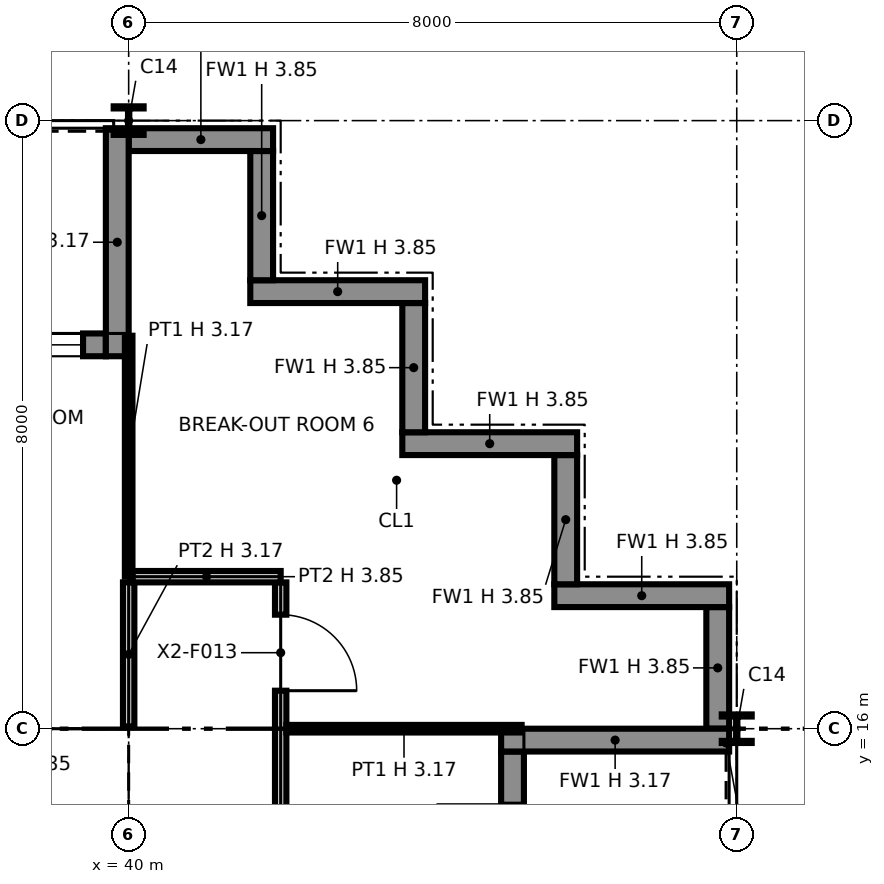
"""IFC4 building model, lengths in metres.
Left out: names, types, materials, properties, quantities, classifications, styles, units other than length and angle.
Written with IfcOpenShell. Run it as: python <this file> out.ifc"""

import sys

from ifc_helpers import new_model, si_unit, direction, frame, frame_2d, origin, origin_2d, place, context, subcontext, project, spatial, polyline, rectangle, i_section, outline, extrude, element, fill, save


model = new_model("IFC4")
c1 = context("Model", 3, precision=1e-05, world=origin(), true_north=direction((0.0, 1.0)))
c2 = subcontext(c1, "Body", "Model", "MODEL_VIEW")
j1 = project(units=[si_unit("LENGTHUNIT", "METRE"), si_unit("PLANEANGLEUNIT", "RADIAN")], contexts=[c1])
p1 = place(None, origin())
s1 = spatial("IfcSite", under=j1, at=p1, CompositionType="ELEMENT")
p2 = place(p1, origin())
s2 = spatial("IfcBuilding", under=s1, at=p2, CompositionType="ELEMENT")
p3 = place(p2, frame((0.0, 0.0, 263.0)))
s3 = spatial("IfcBuildingStorey", under=s2, at=p3, CompositionType="ELEMENT", Elevation=263.0)
p4 = place(p3, frame((40.0, 16.0, 0.0), z_axis=(0.0, 0.0, 1.0), x_axis=(1.0, 0.0, 0.0)))
e1 = element("IfcColumn", 1, at=p4, inside=s3, PredefinedType="COLUMN", context=c2, shape_type="SweptSolid", body=[
    extrude(i_section(OverallWidth=0.371, OverallDepth=0.361, WebThickness=0.012, FlangeThickness=0.02, at=origin_2d()), origin(), (0.0, 0.0, 1.0), 3.85),
])
for number, where, z_axis, x_axis in (
    (2, (40.0, 24.0, 0.0), (0.0, 0.0, 1.0), (1.0, 0.0, 0.0)),
    (3, (48.0, 16.0, 0.0), (0.0, 0.0, 1.0), (1.0, 0.0, 0.0)),
):
    element("IfcColumn", number, at=place(p3, frame(where, z_axis=z_axis, x_axis=x_axis)), inside=s3, PredefinedType="COLUMN", context=c2, shape_type="SweptSolid", body=[
        extrude(i_section(OverallWidth=0.394, OverallDepth=0.376, WebThickness=0.017, FlangeThickness=0.028, at=origin_2d()), origin(), (0.0, 0.0, 1.0), 3.85),
    ])
p5 = place(p3, frame((45.05, 8.3, 0.0), z_axis=(0.0, 0.0, 1.0), x_axis=(0.0, 1.0, 0.0)))
e4 = element("IfcWall", 4, at=p5, inside=s3, PredefinedType="SOLIDWALL", context=c2, shape_type="SweptSolid", body=[
    extrude(rectangle(XDim=7.4, YDim=0.3, at=frame_2d((3.7, 0.0))), origin(), (0.0, 0.0, 1.0), 3.85),
])
p6 = place(p5, frame((0.3, 0.0, 0.9)))
e5 = element("IfcOpeningElement", 5, at=p6, cuts=e4, PredefinedType="OPENING", context=c2, shape_type="SweptSolid", body=[
    extrude(rectangle(XDim=2.8, YDim=2.2, at=frame_2d((1.4, 1.1))), frame((0.0, 0.16, 0.0), z_axis=(0.0, -1.0, 0.0), x_axis=(1.0, 0.0, 0.0)), (0.0, 0.0, 1.0), 0.32),
])
p7 = place(p5, frame((4.7, 0.0, 0.0)))
e6 = element("IfcOpeningElement", 6, at=p7, cuts=e4, PredefinedType="OPENING", context=c2, shape_type="SweptSolid", body=[
    extrude(rectangle(XDim=2.0, YDim=2.4, at=frame_2d((1.0, 1.2))), frame((0.0, 0.16, 0.0), z_axis=(0.0, -1.0, 0.0), x_axis=(1.0, 0.0, 0.0)), (0.0, 0.0, 1.0), 0.32),
])
p8 = place(p3, frame((47.9, 15.85, 0.0), z_axis=(0.0, 0.0, 1.0), x_axis=(-1.0, 0.0, 0.0)))
e7 = element("IfcWall", 7, at=p8, inside=s3, PredefinedType="SOLIDWALL", context=c2, shape_type="SweptSolid", body=[
    extrude(rectangle(XDim=3.0, YDim=0.3, at=frame_2d((1.5, 0.0))), origin(), (0.0, 0.0, 1.0), 3.171),
])
p9 = place(p3, frame((47.75, 16.0, 0.0), z_axis=(0.0, 0.0, 1.0), x_axis=(0.0, 1.0, 0.0)))
e8 = element("IfcWall", 8, at=p9, inside=s3, PredefinedType="SOLIDWALL", context=c2, shape_type="SweptSolid", body=[
    extrude(rectangle(XDim=1.6, YDim=0.3, at=frame_2d((0.8, 0.0))), origin(), (0.0, 0.0, 1.0), 3.85),
])
p10 = place(p3, frame((47.9, 17.75, 0.0), z_axis=(0.0, 0.0, 1.0), x_axis=(-1.0, 0.0, 0.0)))
e9 = element("IfcWall", 9, at=p10, inside=s3, PredefinedType="SOLIDWALL", context=c2, shape_type="SweptSolid", body=[
    extrude(rectangle(XDim=2.3, YDim=0.3, at=frame_2d((1.15, 0.0))), origin(), (0.0, 0.0, 1.0), 3.85),
])
p11 = place(p3, frame((45.75, 17.9, 0.0), z_axis=(0.0, 0.0, 1.0), x_axis=(0.0, 1.0, 0.0)))
e10 = element("IfcWall", 10, at=p11, inside=s3, PredefinedType="SOLIDWALL", context=c2, shape_type="SweptSolid", body=[
    extrude(rectangle(XDim=1.7, YDim=0.3, at=frame_2d((0.85, 0.0))), origin(), (0.0, 0.0, 1.0), 3.85),
])
p12 = place(p3, frame((45.9, 19.75, 0.0), z_axis=(0.0, 0.0, 1.0), x_axis=(-1.0, 0.0, 0.0)))
e11 = element("IfcWall", 11, at=p12, inside=s3, PredefinedType="SOLIDWALL", context=c2, shape_type="SweptSolid", body=[
    extrude(rectangle(XDim=2.3, YDim=0.3, at=frame_2d((1.15, 0.0))), origin(), (0.0, 0.0, 1.0), 3.85),
])
p13 = place(p3, frame((43.75, 19.9, 0.0), z_axis=(0.0, 0.0, 1.0), x_axis=(0.0, 1.0, 0.0)))
e12 = element("IfcWall", 12, at=p13, inside=s3, PredefinedType="SOLIDWALL", context=c2, shape_type="SweptSolid", body=[
    extrude(rectangle(XDim=1.7, YDim=0.3, at=frame_2d((0.85, 0.0))), origin(), (0.0, 0.0, 1.0), 3.85),
])
p14 = place(p3, frame((43.9, 21.75, 0.0), z_axis=(0.0, 0.0, 1.0), x_axis=(-1.0, 0.0, 0.0)))
e13 = element("IfcWall", 13, at=p14, inside=s3, PredefinedType="SOLIDWALL", context=c2, shape_type="SweptSolid", body=[
    extrude(rectangle(XDim=2.3, YDim=0.3, at=frame_2d((1.15, 0.0))), origin(), (0.0, 0.0, 1.0), 3.85),
])
p15 = place(p3, frame((41.75, 21.9, 0.0), z_axis=(0.0, 0.0, 1.0), x_axis=(0.0, 1.0, 0.0)))
e14 = element("IfcWall", 14, at=p15, inside=s3, PredefinedType="SOLIDWALL", context=c2, shape_type="SweptSolid", body=[
    extrude(rectangle(XDim=1.7, YDim=0.3, at=frame_2d((0.85, 0.0))), origin(), (0.0, 0.0, 1.0), 3.85),
])
p16 = place(p3, frame((41.9, 23.75, 0.0), z_axis=(0.0, 0.0, 1.0), x_axis=(-1.0, 0.0, 0.0)))
e15 = element("IfcWall", 15, at=p16, inside=s3, PredefinedType="SOLIDWALL", context=c2, shape_type="SweptSolid", body=[
    extrude(rectangle(XDim=1.9, YDim=0.3, at=frame_2d((0.95, 0.0))), origin(), (0.0, 0.0, 1.0), 3.85),
])
p17 = place(p3, frame((39.7, 21.05, 0.0), z_axis=(0.0, 0.0, 1.0), x_axis=(-1.0, 0.0, 0.0)))
e16 = element("IfcWall", 16, at=p17, inside=s3, PredefinedType="SOLIDWALL", context=c2, shape_type="SweptSolid", body=[
    extrude(rectangle(XDim=7.4, YDim=0.3, at=frame_2d((3.7, 0.0))), origin(), (0.0, 0.0, 1.0), 3.85),
])
p18 = place(p17, frame((0.3, 0.0, 0.9)))
e17 = element("IfcOpeningElement", 17, at=p18, cuts=e16, PredefinedType="OPENING", context=c2, shape_type="SweptSolid", body=[
    extrude(rectangle(XDim=2.8, YDim=2.2, at=frame_2d((1.4, 1.1))), frame((0.0, 0.16, 0.0), z_axis=(0.0, -1.0, 0.0), x_axis=(1.0, 0.0, 0.0)), (0.0, 0.0, 1.0), 0.32),
])
p19 = place(p17, frame((4.7, 0.0, 0.0)))
e18 = element("IfcOpeningElement", 18, at=p19, cuts=e16, PredefinedType="OPENING", context=c2, shape_type="SweptSolid", body=[
    extrude(rectangle(XDim=2.0, YDim=2.4, at=frame_2d((1.0, 1.2))), frame((0.0, 0.16, 0.0), z_axis=(0.0, -1.0, 0.0), x_axis=(1.0, 0.0, 0.0)), (0.0, 0.0, 1.0), 0.32),
])
p20 = place(p3, frame((39.85, 23.9, 0.0), z_axis=(0.0, 0.0, 1.0), x_axis=(0.0, -1.0, 0.0)))
e19 = element("IfcWall", 19, at=p20, inside=s3, PredefinedType="SOLIDWALL", context=c2, shape_type="SweptSolid", body=[
    extrude(rectangle(XDim=3.0, YDim=0.3, at=frame_2d((1.5, 0.0))), origin(), (0.0, 0.0, 1.0), 3.171),
])
p21 = place(p3, frame((24.65, 15.25, 0.0), z_axis=(0.0, 0.0, 1.0), x_axis=(1.0, 0.0, 0.0)))
e20 = element("IfcWall", 20, at=p21, inside=s3, PredefinedType="PARTITIONING", context=c2, shape_type="SweptSolid", body=[
    extrude(outline(polyline([(0.0, 0.0), (14.7, 0.0), (14.7, 3.85), (7.438, 3.85), (7.438, 3.308), (7.262, 3.308), (7.261, 3.85), (0.0, 3.85), (0.0, 0.0)])), frame((0.0, 0.1, 0.0), z_axis=(0.0, -1.0, 0.0), x_axis=(1.0, 0.0, 0.0)), (0.0, 0.0, 1.0), 0.2),
])
p22 = place(p21, frame((2.85, 0.0, 0.0)))
e21 = element("IfcOpeningElement", 21, at=p22, cuts=e20, PredefinedType="OPENING", context=c2, shape_type="SweptSolid", body=[
    extrude(rectangle(XDim=1.8, YDim=2.1, at=frame_2d((0.9, 1.05))), frame((0.0, 0.11, 0.0), z_axis=(0.0, -1.0, 0.0), x_axis=(1.0, 0.0, 0.0)), (0.0, 0.0, 1.0), 0.22),
])
p23 = place(p21, frame((9.95, 0.0, 0.0), z_axis=(0.0, 0.0, 1.0), x_axis=(-1.0, 0.0, 0.0)))
e22 = element("IfcOpeningElement", 22, at=p23, cuts=e20, PredefinedType="OPENING", context=c2, shape_type="SweptSolid", body=[
    extrude(rectangle(XDim=1.4, YDim=2.1, at=frame_2d((0.7, 1.05))), frame((0.0, 0.11, 0.0), z_axis=(0.0, -1.0, 0.0), x_axis=(1.0, 0.0, 0.0)), (0.0, 0.0, 1.0), 0.22),
])
p24 = place(p21, frame((13.4, 0.0, 0.0), z_axis=(0.0, 0.0, 1.0), x_axis=(-1.0, 0.0, 0.0)))
e23 = element("IfcOpeningElement", 23, at=p24, cuts=e20, PredefinedType="OPENING", context=c2, shape_type="SweptSolid", body=[
    extrude(rectangle(XDim=1.4, YDim=2.1, at=frame_2d((0.7, 1.05))), frame((0.0, 0.11, 0.0), z_axis=(0.0, -1.0, 0.0), x_axis=(1.0, 0.0, 0.0)), (0.0, 0.0, 1.0), 0.22),
])
p25 = place(p3, frame((39.25, 8.85, 0.0), z_axis=(0.0, 0.0, 1.0), x_axis=(0.0, 1.0, 0.0)))
e24 = element("IfcWall", 24, at=p25, inside=s3, PredefinedType="PARTITIONING", context=c2, shape_type="SweptSolid", body=[
    extrude(rectangle(XDim=6.3, YDim=0.2, at=frame_2d((3.15, 0.0))), origin(), (0.0, 0.0, 1.0), 3.85),
])
p26 = place(p3, frame((42.0, 6.0, 0.0), z_axis=(0.0, 0.0, 1.0), x_axis=(0.0, 1.0, 0.0)))
e25 = element("IfcWall", 25, at=p26, inside=s3, PredefinedType="PARTITIONING", context=c2, shape_type="SweptSolid", body=[
    extrude(outline(polyline([(0.0, 0.0), (11.925, 0.0), (11.925, 3.85), (10.3, 3.85), (10.298, 3.172), (9.702, 3.172), (9.7, 3.85), (6.3, 3.85), (6.298, 3.172), (5.702, 3.172), (5.7, 3.85), (2.3, 3.85), (2.298, 3.172), (1.702, 3.172), (1.7, 3.85), (0.0, 3.85), (0.0, 0.0)])), frame((0.0, 0.075, 0.0), z_axis=(0.0, -1.0, 0.0), x_axis=(1.0, 0.0, 0.0)), (0.0, 0.0, 1.0), 0.15),
])
p27 = place(p26, frame((6.5, 0.0, 0.0), z_axis=(0.0, 0.0, 1.0), x_axis=(-1.0, 0.0, 0.0)))
e26 = element("IfcOpeningElement", 26, at=p27, cuts=e25, PredefinedType="OPENING", context=c2, shape_type="SweptSolid", body=[
    extrude(rectangle(XDim=1.0, YDim=2.1, at=frame_2d((0.5, 1.05))), frame((0.0, 0.085, 0.0), z_axis=(0.0, -1.0, 0.0), x_axis=(1.0, 0.0, 0.0)), (0.0, 0.0, 1.0), 0.17),
])
p28 = place(p26, frame((11.5, 0.0, 0.0), z_axis=(0.0, 0.0, 1.0), x_axis=(-1.0, 0.0, 0.0)))
e27 = element("IfcOpeningElement", 27, at=p28, cuts=e25, PredefinedType="OPENING", context=c2, shape_type="SweptSolid", body=[
    extrude(rectangle(XDim=1.0, YDim=2.1, at=frame_2d((0.5, 1.05))), frame((0.0, 0.085, 0.0), z_axis=(0.0, -1.0, 0.0), x_axis=(1.0, 0.0, 0.0)), (0.0, 0.0, 1.0), 0.17),
])
p29 = place(p3, frame((42.075, 16.0, 0.0), z_axis=(0.0, 0.0, 1.0), x_axis=(1.0, 0.0, 0.0)))
e28 = element("IfcWall", 28, at=p29, inside=s3, PredefinedType="PARTITIONING", context=c2, shape_type="SweptSolid", body=[
    extrude(rectangle(XDim=3.095, YDim=0.1, at=frame_2d((1.547, 0.0))), origin(), (0.0, 0.0, 1.0), 3.172),
])
p30 = place(p3, frame((40.0, 16.03, 0.0), z_axis=(0.0, 0.0, 1.0), x_axis=(0.0, 1.0, 0.0)))
e29 = element("IfcWall", 29, at=p30, inside=s3, PredefinedType="PARTITIONING", context=c2, shape_type="SweptSolid", body=[
    extrude(rectangle(XDim=1.895, YDim=0.15, at=frame_2d((0.948, 0.0))), origin(), (0.0, 0.0, 1.0), 3.172),
])
p31 = place(p3, frame((40.05, 18.0, 0.0), z_axis=(0.0, 0.0, 1.0), x_axis=(1.0, 0.0, 0.0)))
e30 = element("IfcWall", 30, at=p31, inside=s3, PredefinedType="PARTITIONING", context=c2, shape_type="SweptSolid", body=[
    extrude(rectangle(XDim=1.95, YDim=0.15, at=frame_2d((0.975, 0.0))), origin(), (0.0, 0.0, 1.0), 3.85),
])
p32 = place(p3, frame((40.0, 18.0, 0.0), z_axis=(0.0, 0.0, 1.0), x_axis=(0.0, 1.0, 0.0)))
e31 = element("IfcWall", 31, at=p32, inside=s3, PredefinedType="PARTITIONING", context=c2, shape_type="SweptSolid", body=[
    extrude(rectangle(XDim=3.17, YDim=0.1, at=frame_2d((1.585, 0.0))), origin(), (0.0, 0.0, 1.0), 3.172),
])
p33 = place(p18, origin())
e32 = element("IfcWindow", 32, at=p33, inside=s3, PartitioningType="SINGLE_PANEL", PredefinedType="WINDOW", context=c2, shape_type="SweptSolid", body=[
    extrude(rectangle(XDim=2.8, YDim=2.2, at=frame_2d((1.4, 1.1))), frame((0.0, 0.03, 0.0), z_axis=(0.0, -1.0, 0.0), x_axis=(1.0, 0.0, 0.0)), (0.0, 0.0, 1.0), 0.06),
])
fill(e17, e32)
p34 = place(p28, origin())
e33 = element("IfcDoor", 33, at=p34, inside=s3, OperationType="SINGLE_SWING_RIGHT", PredefinedType="DOOR", context=c2, shape_type="SweptSolid", body=[
    extrude(rectangle(XDim=1.0, YDim=2.1, at=frame_2d((0.5, 1.05))), frame((0.0, 0.025, 0.0), z_axis=(0.0, -1.0, 0.0), x_axis=(1.0, 0.0, 0.0)), (0.0, 0.0, 1.0), 0.05),
])
fill(e27, e33)
save(model, sys.argv[1])
